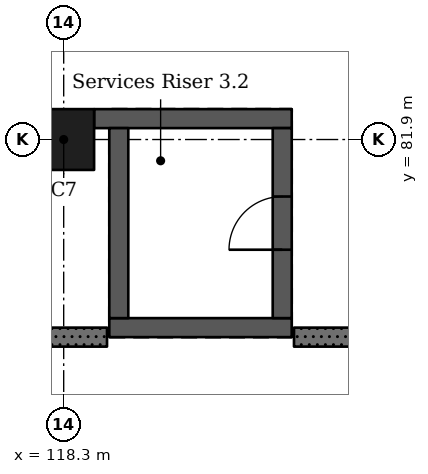
"""IFC4 building model, lengths in metres.
Left out: names, types, materials, properties, quantities, classifications, styles, units other than length and angle.
Written with IfcOpenShell. Run it as: python <this file> out.ifc"""

import sys

from ifc_helpers import new_model, si_unit, direction, frame, frame_2d, origin, origin_2d, place, context, subcontext, project, spatial, rectangle, extrude, element, fill, save


model = new_model("IFC4")
c1 = context("Model", 3, precision=1e-05, world=origin(), true_north=direction((0.0, 1.0)))
c2 = subcontext(c1, "Body", "Model", "MODEL_VIEW")
j1 = project(units=[si_unit("LENGTHUNIT", "METRE"), si_unit("PLANEANGLEUNIT", "RADIAN")], contexts=[c1])
p1 = place(None, origin())
s1 = spatial("IfcSite", under=j1, at=p1, CompositionType="ELEMENT")
p2 = place(p1, origin())
s2 = spatial("IfcBuilding", under=s1, at=p2, CompositionType="ELEMENT")
p3 = place(p2, frame((0.0, 0.0, 6.37)))
s3 = spatial("IfcBuildingStorey", under=s2, at=p3, CompositionType="ELEMENT", Elevation=6.37)
p4 = place(p3, frame((118.3, 81.9, 0.0), z_axis=(0.0, 0.0, 1.0), x_axis=(1.0, 0.0, 0.0)))
e1 = element("IfcColumn", 1, at=p4, inside=s3, PredefinedType="COLUMN", context=c2, shape_type="SweptSolid", body=[
    extrude(rectangle(XDim=0.8, YDim=0.8, at=origin_2d()), origin(), (0.0, 0.0, 1.0), 4.55),
])
p5 = place(p3, frame((121.3, 79.425, 0.0), z_axis=(0.0, 0.0, 1.0), x_axis=(-1.0, 0.0, 0.0)))
e2 = element("IfcWall", 2, at=p5, inside=s3, PredefinedType="SHEAR", context=c2, shape_type="SweptSolid", body=[
    extrude(rectangle(XDim=2.4, YDim=0.25, at=frame_2d((1.2, 0.0))), origin(), (0.0, 0.0, 1.0), 4.55),
])
p6 = place(p3, frame((121.3, 82.175, 0.0), z_axis=(0.0, 0.0, 1.0), x_axis=(-1.0, 0.0, 0.0)))
e3 = element("IfcWall", 3, at=p6, inside=s3, PredefinedType="SHEAR", context=c2, shape_type="SweptSolid", body=[
    extrude(rectangle(XDim=2.6, YDim=0.25, at=frame_2d((1.3, 0.0))), origin(), (0.0, 0.0, 1.0), 4.55),
])
p7 = place(p3, frame((119.025, 82.05, 0.0), z_axis=(0.0, 0.0, 1.0), x_axis=(0.0, -1.0, 0.0)))
e4 = element("IfcWall", 4, at=p7, inside=s3, PredefinedType="SHEAR", context=c2, shape_type="SweptSolid", body=[
    extrude(rectangle(XDim=2.5, YDim=0.25, at=frame_2d((1.25, 0.0))), origin(), (0.0, 0.0, 1.0), 4.55),
])
p8 = place(p3, frame((121.175, 82.05, 0.0), z_axis=(0.0, 0.0, 1.0), x_axis=(0.0, -1.0, 0.0)))
e5 = element("IfcWall", 5, at=p8, inside=s3, PredefinedType="SHEAR", context=c2, shape_type="SweptSolid", body=[
    extrude(rectangle(XDim=2.5, YDim=0.25, at=frame_2d((1.25, 0.0))), origin(), (0.0, 0.0, 1.0), 4.55),
])
p9 = place(p8, frame((0.9, 0.0, 0.0)))
e6 = element("IfcOpeningElement", 6, at=p9, cuts=e5, PredefinedType="OPENING", context=c2, shape_type="SweptSolid", body=[
    extrude(rectangle(XDim=0.7, YDim=2.1, at=frame_2d((0.35, 1.05))), frame((0.0, 0.135, 0.0), z_axis=(0.0, -1.0, 0.0), x_axis=(1.0, 0.0, 0.0)), (0.0, 0.0, 1.0), 0.27),
])
p10 = place(p3, frame((112.075, 79.3, 0.0), z_axis=(0.0, 0.0, 1.0), x_axis=(1.0, 0.0, 0.0)))
e7 = element("IfcWall", 7, at=p10, inside=s3, PredefinedType="SOLIDWALL", context=c2, shape_type="SweptSolid", body=[
    extrude(rectangle(XDim=6.795, YDim=0.25, at=frame_2d((3.397, 0.0))), origin(), (0.0, 0.0, 1.0), 4.25),
])
p11 = place(p3, frame((126.825, 79.3, 0.0), z_axis=(0.0, 0.0, 1.0), x_axis=(-1.0, 0.0, 0.0)))
e8 = element("IfcWall", 8, at=p11, inside=s3, PredefinedType="SOLIDWALL", context=c2, shape_type="SweptSolid", body=[
    extrude(rectangle(XDim=5.495, YDim=0.25, at=frame_2d((2.748, 0.0))), origin(), (0.0, 0.0, 1.0), 4.25),
])
p12 = place(p9, origin())
e9 = element("IfcDoor", 9, at=p12, inside=s3, OperationType="SINGLE_SWING_RIGHT", PredefinedType="DOOR", context=c2, shape_type="SweptSolid", body=[
    extrude(rectangle(XDim=0.7, YDim=2.1, at=frame_2d((0.35, 1.05))), frame((0.0, 0.025, 0.0), z_axis=(0.0, -1.0, 0.0), x_axis=(1.0, 0.0, 0.0)), (0.0, 0.0, 1.0), 0.05),
])
fill(e6, e9)
save(model, sys.argv[1])
